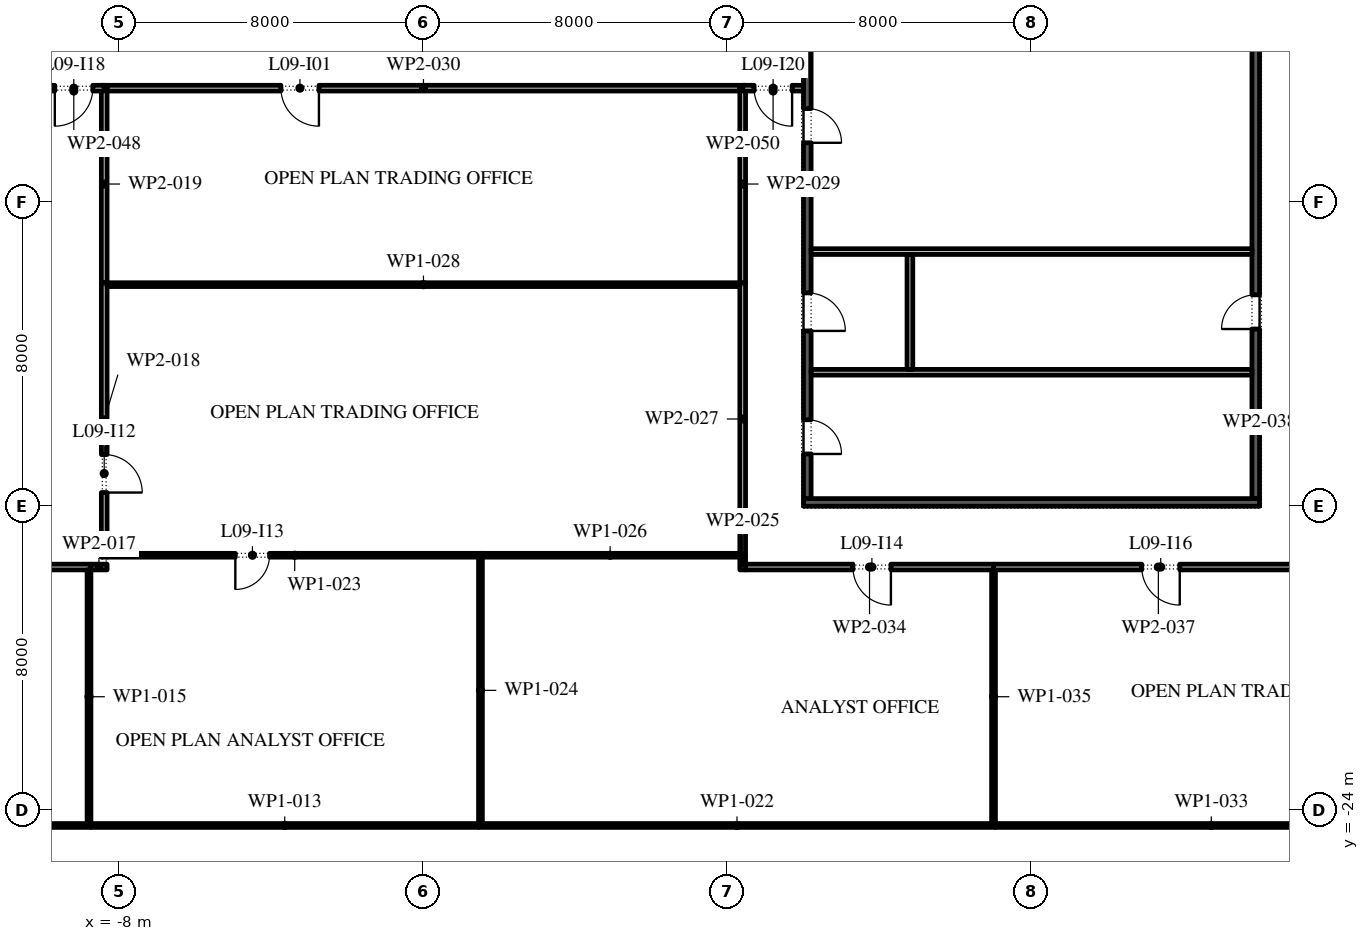
"""IFC4 building model, lengths in metres.
Left out: names, types, materials, properties, quantities, classifications, styles, units other than length and angle.
Written with IfcOpenShell. Run it as: python <this file> out.ifc"""

import sys

from ifc_helpers import new_model, si_unit, direction, frame, frame_2d, origin, place, context, subcontext, project, spatial, rectangle, extrude, element, fill, save


model = new_model("IFC4")
c1 = context("Model", 3, precision=1e-05, world=origin(), true_north=direction((0.0, 1.0)))
c2 = subcontext(c1, "Body", "Model", "MODEL_VIEW")
j1 = project(units=[si_unit("LENGTHUNIT", "METRE"), si_unit("PLANEANGLEUNIT", "RADIAN")], contexts=[c1])
p1 = place(None, origin())
s1 = spatial("IfcSite", under=j1, at=p1, CompositionType="ELEMENT")
p2 = place(p1, origin())
s2 = spatial("IfcBuilding", under=s1, at=p2, CompositionType="ELEMENT")
p3 = place(p2, frame((0.0, 0.0, 48.0)))
s3 = spatial("IfcBuildingStorey", under=s2, at=p3, CompositionType="ELEMENT", Elevation=48.0)
p4 = place(p3, frame((21.9, -15.8, 0.0), z_axis=(0.0, 0.0, 1.0), x_axis=(0.0, 1.0, 0.0)))
e1 = element("IfcWall", 1, at=p4, inside=s3, PredefinedType="SHEAR", context=c2, shape_type="SweptSolid", body=[
    extrude(rectangle(XDim=13.05, YDim=0.2, at=frame_2d((6.525, 0.0))), origin(), (0.0, 0.0, 1.0), 4.0),
])
p5 = place(p4, frame((4.462, 0.0, 0.0)))
e2 = element("IfcOpeningElement", 2, at=p5, cuts=e1, PredefinedType="OPENING", context=c2, shape_type="SweptSolid", body=[
    extrude(rectangle(XDim=0.9, YDim=2.1, at=frame_2d((0.45, 1.05))), frame((0.0, 0.11, 0.0), z_axis=(0.0, -1.0, 0.0), x_axis=(1.0, 0.0, 0.0)), (0.0, 0.0, 1.0), 0.22),
])
p6 = place(p3, frame((10.1, -15.8, 0.0), z_axis=(0.0, 0.0, 1.0), x_axis=(0.0, 1.0, 0.0)))
e3 = element("IfcWall", 3, at=p6, inside=s3, PredefinedType="SHEAR", context=c2, shape_type="SweptSolid", body=[
    extrude(rectangle(XDim=13.05, YDim=0.2, at=frame_2d((6.525, 0.0))), origin(), (0.0, 0.0, 1.0), 4.0),
])
p7 = place(p6, frame((1.175, 0.0, 0.0)))
e4 = element("IfcOpeningElement", 4, at=p7, cuts=e3, PredefinedType="OPENING", context=c2, shape_type="SweptSolid", body=[
    extrude(rectangle(XDim=0.9, YDim=2.1, at=frame_2d((0.45, 1.05))), frame((0.0, 0.11, 0.0), z_axis=(0.0, -1.0, 0.0), x_axis=(1.0, 0.0, 0.0)), (0.0, 0.0, 1.0), 0.22),
])
p8 = place(p6, frame((4.413, 0.0, 0.0)))
e5 = element("IfcOpeningElement", 5, at=p8, cuts=e3, PredefinedType="OPENING", context=c2, shape_type="SweptSolid", body=[
    extrude(rectangle(XDim=1.0, YDim=2.1, at=frame_2d((0.5, 1.05))), frame((0.0, 0.11, 0.0), z_axis=(0.0, -1.0, 0.0), x_axis=(1.0, 0.0, 0.0)), (0.0, 0.0, 1.0), 0.22),
])
p9 = place(p6, frame((9.363, 0.0, 0.0)))
e6 = element("IfcOpeningElement", 6, at=p9, cuts=e3, PredefinedType="OPENING", context=c2, shape_type="SweptSolid", body=[
    extrude(rectangle(XDim=0.9, YDim=2.1, at=frame_2d((0.45, 1.05))), frame((0.0, 0.11, 0.0), z_axis=(0.0, -1.0, 0.0), x_axis=(1.0, 0.0, 0.0)), (0.0, 0.0, 1.0), 0.22),
])
p10 = place(p3, frame((10.0, -15.9, 0.0), z_axis=(0.0, 0.0, 1.0), x_axis=(1.0, 0.0, 0.0)))
e7 = element("IfcWall", 7, at=p10, inside=s3, PredefinedType="SHEAR", context=c2, shape_type="SweptSolid", body=[
    extrude(rectangle(XDim=12.0, YDim=0.2, at=frame_2d((6.0, 0.0))), origin(), (0.0, 0.0, 1.0), 4.0),
])
for number, where, z_axis, x_axis in (
    (8, (10.2, -9.3, 0.0), (0.0, 0.0, 1.0), (1.0, 0.0, 0.0)),
    (9, (10.2, -12.475, 0.0), (0.0, 0.0, 1.0), (1.0, 0.0, 0.0)),
):
    element("IfcWall", number, at=place(p3, frame(where, z_axis=z_axis, x_axis=x_axis)), inside=s3, PredefinedType="PARTITIONING", context=c2, shape_type="SweptSolid", body=[
        extrude(rectangle(XDim=11.6, YDim=0.15, at=frame_2d((5.8, 0.0))), origin(), (0.0, 0.0, 1.0), 4.0),
    ])
p11 = place(p3, frame((12.8, -12.4, 0.0), z_axis=(0.0, 0.0, 1.0), x_axis=(0.0, 1.0, 0.0)))
e10 = element("IfcWall", 10, at=p11, inside=s3, PredefinedType="PARTITIONING", context=c2, shape_type="SweptSolid", body=[
    extrude(rectangle(XDim=3.025, YDim=0.15, at=frame_2d((1.512, 0.0))), origin(), (0.0, 0.0, 1.0), 4.0),
])
p12 = place(p3, frame((-26.41, -24.4, 0.0), z_axis=(0.0, 0.0, 1.0), x_axis=(1.0, 0.0, 0.0)))
e11 = element("IfcWall", 11, at=p12, inside=s3, PredefinedType="PARTITIONING", context=c2, shape_type="SweptSolid", body=[
    extrude(rectangle(XDim=17.66, YDim=0.1, at=frame_2d((8.83, 0.0))), origin(), (0.0, 0.0, 1.0), 4.0),
])
p13 = place(p12, frame((10.2, 0.0, 0.0)))
e12 = element("IfcOpeningElement", 12, at=p13, cuts=e11, PredefinedType="OPENING", context=c2, shape_type="SweptSolid", body=[
    extrude(rectangle(XDim=0.9, YDim=2.1, at=frame_2d((0.45, 1.05))), frame((0.0, 0.06, 0.0), z_axis=(0.0, -1.0, 0.0), x_axis=(1.0, 0.0, 0.0)), (0.0, 0.0, 1.0), 0.12),
])
p14 = place(p3, frame((-8.75, -24.4, 0.0), z_axis=(0.0, 0.0, 1.0), x_axis=(1.0, 0.0, 0.0)))
e13 = element("IfcWall", 13, at=p14, inside=s3, PredefinedType="PARTITIONING", context=c2, shape_type="SweptSolid", body=[
    extrude(rectangle(XDim=10.2, YDim=0.1, at=frame_2d((5.1, 0.0))), origin(), (0.0, 0.0, 1.0), 4.0),
])
p15 = place(p3, frame((-8.75, -17.6, 0.0), z_axis=(0.0, 0.0, 1.0), x_axis=(-1.0, 0.0, 0.0)))
e14 = element("IfcWall", 14, at=p15, inside=s3, PredefinedType="PARTITIONING", context=c2, shape_type="SweptSolid", body=[
    extrude(rectangle(XDim=14.775, YDim=0.15, at=frame_2d((7.387, 0.0))), origin(), (0.0, 0.0, 1.0), 4.0),
])
p16 = place(p15, frame((6.95, 0.0, 0.0)))
e15 = element("IfcOpeningElement", 15, at=p16, cuts=e14, PredefinedType="OPENING", context=c2, shape_type="SweptSolid", body=[
    extrude(rectangle(XDim=1.0, YDim=2.1, at=frame_2d((0.5, 1.05))), frame((0.0, 0.085, 0.0), z_axis=(0.0, -1.0, 0.0), x_axis=(1.0, 0.0, 0.0)), (0.0, 0.0, 1.0), 0.17),
])
p17 = place(p3, frame((-8.8, -17.675, 0.0), z_axis=(0.0, 0.0, 1.0), x_axis=(0.0, -1.0, 0.0)))
e16 = element("IfcWall", 16, at=p17, inside=s3, PredefinedType="PARTITIONING", context=c2, shape_type="SweptSolid", body=[
    extrude(rectangle(XDim=6.675, YDim=0.1, at=frame_2d((3.337, 0.0))), origin(), (0.0, 0.0, 1.0), 4.0),
])
p18 = place(p3, frame((-8.325, -17.6, 0.0), z_axis=(0.0, 0.0, 1.0), x_axis=(-1.0, 0.0, 0.0)))
e17 = element("IfcWall", 17, at=p18, inside=s3, PredefinedType="PARTITIONING", context=c2, shape_type="SweptSolid", body=[
    extrude(rectangle(XDim=0.425, YDim=0.15, at=frame_2d((0.212, 0.0))), origin(), (0.0, 0.0, 1.0), 4.0),
])
p19 = place(p3, frame((-8.4, -10.12, 0.0), z_axis=(0.0, 0.0, 1.0), x_axis=(0.0, -1.0, 0.0)))
e18 = element("IfcWall", 18, at=p19, inside=s3, PredefinedType="PARTITIONING", context=c2, shape_type="SweptSolid", body=[
    extrude(rectangle(XDim=7.22, YDim=0.15, at=frame_2d((3.61, 0.0))), origin(), (0.0, 0.0, 1.0), 4.0),
])
p20 = place(p19, frame((4.52, 0.0, 0.0)))
e19 = element("IfcOpeningElement", 19, at=p20, cuts=e18, PredefinedType="OPENING", context=c2, shape_type="SweptSolid", body=[
    extrude(rectangle(XDim=1.0, YDim=2.1, at=frame_2d((0.5, 1.05))), frame((0.0, 0.085, 0.0), z_axis=(0.0, -1.0, 0.0), x_axis=(1.0, 0.0, 0.0)), (0.0, 0.0, 1.0), 0.17),
])
p21 = place(p3, frame((-8.4, -4.925, 0.0), z_axis=(0.0, 0.0, 1.0), x_axis=(0.0, -1.0, 0.0)))
e20 = element("IfcWall", 20, at=p21, inside=s3, PredefinedType="PARTITIONING", context=c2, shape_type="SweptSolid", body=[
    extrude(rectangle(XDim=5.195, YDim=0.15, at=frame_2d((2.598, 0.0))), origin(), (0.0, 0.0, 1.0), 4.0),
])
p22 = place(p3, frame((1.45, -24.4, 0.0), z_axis=(0.0, 0.0, 1.0), x_axis=(1.0, 0.0, 0.0)))
e21 = element("IfcWall", 21, at=p22, inside=s3, PredefinedType="PARTITIONING", context=c2, shape_type="SweptSolid", body=[
    extrude(rectangle(XDim=13.6, YDim=0.1, at=frame_2d((6.8, 0.0))), origin(), (0.0, 0.0, 1.0), 4.0),
])
p23 = place(p3, frame((1.55, -17.29, 0.0), z_axis=(0.0, 0.0, 1.0), x_axis=(-1.0, 0.0, 0.0)))
e22 = element("IfcWall", 22, at=p23, inside=s3, PredefinedType="PARTITIONING", context=c2, shape_type="SweptSolid", body=[
    extrude(rectangle(XDim=9.875, YDim=0.1, at=frame_2d((4.938, 0.0))), origin(), (0.0, 0.0, 1.0), 4.0),
])
p24 = place(p23, frame((5.6, 0.0, 0.0)))
e23 = element("IfcOpeningElement", 23, at=p24, cuts=e22, PredefinedType="OPENING", context=c2, shape_type="SweptSolid", body=[
    extrude(rectangle(XDim=0.9, YDim=2.1, at=frame_2d((0.45, 1.05))), frame((0.0, 0.06, 0.0), z_axis=(0.0, -1.0, 0.0), x_axis=(1.0, 0.0, 0.0)), (0.0, 0.0, 1.0), 0.12),
])
p25 = place(p3, frame((1.5, -17.34, 0.0), z_axis=(0.0, 0.0, 1.0), x_axis=(0.0, -1.0, 0.0)))
e24 = element("IfcWall", 24, at=p25, inside=s3, PredefinedType="PARTITIONING", context=c2, shape_type="SweptSolid", body=[
    extrude(rectangle(XDim=7.01, YDim=0.1, at=frame_2d((3.505, 0.0))), origin(), (0.0, 0.0, 1.0), 4.0),
])
p26 = place(p3, frame((8.4, -17.675, 0.0), z_axis=(0.0, 0.0, 1.0), x_axis=(0.0, 1.0, 0.0)))
e25 = element("IfcWall", 25, at=p26, inside=s3, PredefinedType="PARTITIONING", context=c2, shape_type="SweptSolid", body=[
    extrude(rectangle(XDim=0.385, YDim=0.15, at=frame_2d((0.192, 0.0))), origin(), (0.0, 0.0, 1.0), 4.0),
])
p27 = place(p3, frame((8.325, -17.29, 0.0), z_axis=(0.0, 0.0, 1.0), x_axis=(-1.0, 0.0, 0.0)))
e26 = element("IfcWall", 26, at=p27, inside=s3, PredefinedType="PARTITIONING", context=c2, shape_type="SweptSolid", body=[
    extrude(rectangle(XDim=6.825, YDim=0.1, at=frame_2d((3.413, 0.0))), origin(), (0.0, 0.0, 1.0), 4.0),
])
p28 = place(p3, frame((8.4, -17.29, 0.0), z_axis=(0.0, 0.0, 1.0), x_axis=(0.0, 1.0, 0.0)))
e27 = element("IfcWall", 27, at=p28, inside=s3, PredefinedType="PARTITIONING", context=c2, shape_type="SweptSolid", body=[
    extrude(rectangle(XDim=7.17, YDim=0.15, at=frame_2d((3.585, 0.0))), origin(), (0.0, 0.0, 1.0), 4.0),
])
p29 = place(p3, frame((8.325, -10.17, 0.0), z_axis=(0.0, 0.0, 1.0), x_axis=(-1.0, 0.0, 0.0)))
e28 = element("IfcWall", 28, at=p29, inside=s3, PredefinedType="PARTITIONING", context=c2, shape_type="SweptSolid", body=[
    extrude(rectangle(XDim=16.65, YDim=0.1, at=frame_2d((8.325, 0.0))), origin(), (0.0, 0.0, 1.0), 4.0),
])
p30 = place(p3, frame((8.4, -10.12, 0.0), z_axis=(0.0, 0.0, 1.0), x_axis=(0.0, 1.0, 0.0)))
e29 = element("IfcWall", 29, at=p30, inside=s3, PredefinedType="PARTITIONING", context=c2, shape_type="SweptSolid", body=[
    extrude(rectangle(XDim=5.195, YDim=0.15, at=frame_2d((2.598, 0.0))), origin(), (0.0, 0.0, 1.0), 4.0),
])
p31 = place(p3, frame((8.325, -5.0, 0.0), z_axis=(0.0, 0.0, 1.0), x_axis=(-1.0, 0.0, 0.0)))
e30 = element("IfcWall", 30, at=p31, inside=s3, PredefinedType="PARTITIONING", context=c2, shape_type="SweptSolid", body=[
    extrude(rectangle(XDim=16.65, YDim=0.15, at=frame_2d((8.325, 0.0))), origin(), (0.0, 0.0, 1.0), 4.0),
])
p32 = place(p31, frame((11.075, 0.0, 0.0)))
e31 = element("IfcOpeningElement", 31, at=p32, cuts=e30, PredefinedType="OPENING", context=c2, shape_type="SweptSolid", body=[
    extrude(rectangle(XDim=1.0, YDim=2.1, at=frame_2d((0.5, 1.05))), frame((0.0, 0.085, 0.0), z_axis=(0.0, -1.0, 0.0), x_axis=(1.0, 0.0, 0.0)), (0.0, 0.0, 1.0), 0.17),
])
p33 = place(p3, frame((15.05, -24.4, 0.0), z_axis=(0.0, 0.0, 1.0), x_axis=(1.0, 0.0, 0.0)))
e32 = element("IfcWall", 32, at=p33, inside=s3, PredefinedType="PARTITIONING", context=c2, shape_type="SweptSolid", body=[
    extrude(rectangle(XDim=11.36, YDim=0.1, at=frame_2d((5.68, 0.0))), origin(), (0.0, 0.0, 1.0), 4.0),
])
p34 = place(p3, frame((15.0, -17.6, 0.0), z_axis=(0.0, 0.0, 1.0), x_axis=(-1.0, 0.0, 0.0)))
e33 = element("IfcWall", 33, at=p34, inside=s3, PredefinedType="PARTITIONING", context=c2, shape_type="SweptSolid", body=[
    extrude(rectangle(XDim=6.525, YDim=0.15, at=frame_2d((3.262, 0.0))), origin(), (0.0, 0.0, 1.0), 4.0),
])
p35 = place(p34, frame((2.7, 0.0, 0.0)))
e34 = element("IfcOpeningElement", 34, at=p35, cuts=e33, PredefinedType="OPENING", context=c2, shape_type="SweptSolid", body=[
    extrude(rectangle(XDim=1.0, YDim=2.1, at=frame_2d((0.5, 1.05))), frame((0.0, 0.085, 0.0), z_axis=(0.0, -1.0, 0.0), x_axis=(1.0, 0.0, 0.0)), (0.0, 0.0, 1.0), 0.17),
])
p36 = place(p3, frame((15.0, -17.675, 0.0), z_axis=(0.0, 0.0, 1.0), x_axis=(0.0, -1.0, 0.0)))
e35 = element("IfcWall", 35, at=p36, inside=s3, PredefinedType="PARTITIONING", context=c2, shape_type="SweptSolid", body=[
    extrude(rectangle(XDim=6.675, YDim=0.1, at=frame_2d((3.337, 0.0))), origin(), (0.0, 0.0, 1.0), 4.0),
])
p37 = place(p3, frame((23.675, -17.6, 0.0), z_axis=(0.0, 0.0, 1.0), x_axis=(-1.0, 0.0, 0.0)))
e36 = element("IfcWall", 36, at=p37, inside=s3, PredefinedType="PARTITIONING", context=c2, shape_type="SweptSolid", body=[
    extrude(rectangle(XDim=8.675, YDim=0.15, at=frame_2d((4.337, 0.0))), origin(), (0.0, 0.0, 1.0), 4.0),
])
p38 = place(p37, frame((3.775, 0.0, 0.0)))
e37 = element("IfcOpeningElement", 37, at=p38, cuts=e36, PredefinedType="OPENING", context=c2, shape_type="SweptSolid", body=[
    extrude(rectangle(XDim=1.0, YDim=2.1, at=frame_2d((0.5, 1.05))), frame((0.0, 0.085, 0.0), z_axis=(0.0, -1.0, 0.0), x_axis=(1.0, 0.0, 0.0)), (0.0, 0.0, 1.0), 0.17),
])
p39 = place(p3, frame((-8.4, -5.0, 0.0), z_axis=(0.0, 0.0, 1.0), x_axis=(-1.0, 0.0, 0.0)))
e38 = element("IfcWall", 38, at=p39, inside=s3, PredefinedType="PARTITIONING", context=c2, shape_type="SweptSolid", body=[
    extrude(rectangle(XDim=1.6, YDim=0.15, at=frame_2d((0.8, 0.0))), origin(), (0.0, 0.0, 1.0), 4.0),
])
p40 = place(p39, frame((0.3, 0.0, 0.0)))
e39 = element("IfcOpeningElement", 39, at=p40, cuts=e38, PredefinedType="OPENING", context=c2, shape_type="SweptSolid", body=[
    extrude(rectangle(XDim=1.0, YDim=2.1, at=frame_2d((0.5, 1.05))), frame((0.0, 0.085, 0.0), z_axis=(0.0, -1.0, 0.0), x_axis=(1.0, 0.0, 0.0)), (0.0, 0.0, 1.0), 0.17),
])
p41 = place(p3, frame((10.0, -5.0, 0.0), z_axis=(0.0, 0.0, 1.0), x_axis=(-1.0, 0.0, 0.0)))
e40 = element("IfcWall", 40, at=p41, inside=s3, PredefinedType="PARTITIONING", context=c2, shape_type="SweptSolid", body=[
    extrude(rectangle(XDim=1.6, YDim=0.15, at=frame_2d((0.8, 0.0))), origin(), (0.0, 0.0, 1.0), 4.0),
])
p42 = place(p41, frame((0.3, 0.0, 0.0)))
e41 = element("IfcOpeningElement", 41, at=p42, cuts=e40, PredefinedType="OPENING", context=c2, shape_type="SweptSolid", body=[
    extrude(rectangle(XDim=1.0, YDim=2.1, at=frame_2d((0.5, 1.05))), frame((0.0, 0.085, 0.0), z_axis=(0.0, -1.0, 0.0), x_axis=(1.0, 0.0, 0.0)), (0.0, 0.0, 1.0), 0.17),
])
p43 = place(p7, frame((0.9, -0.15, 0.0), z_axis=(0.0, 0.0, 1.0), x_axis=(-1.0, 0.0, 0.0)))
e42 = element("IfcDoor", 42, at=p43, inside=s3, OperationType="SINGLE_SWING_LEFT", PredefinedType="DOOR", context=c2, shape_type="SweptSolid", body=[
    extrude(rectangle(XDim=0.9, YDim=2.1, at=frame_2d((0.45, 1.05))), frame((0.0, -0.05, 0.0), z_axis=(0.0, -1.0, 0.0), x_axis=(1.0, 0.0, 0.0)), (0.0, 0.0, 1.0), 0.05),
])
fill(e4, e42)
p44 = place(p8, frame((1.0, -0.15, 0.0), z_axis=(0.0, 0.0, 1.0), x_axis=(-1.0, 0.0, 0.0)))
e43 = element("IfcDoor", 43, at=p44, inside=s3, OperationType="SINGLE_SWING_LEFT", PredefinedType="DOOR", context=c2, shape_type="SweptSolid", body=[
    extrude(rectangle(XDim=1.0, YDim=2.1, at=frame_2d((0.5, 1.05))), frame((0.0, -0.05, 0.0), z_axis=(0.0, -1.0, 0.0), x_axis=(1.0, 0.0, 0.0)), (0.0, 0.0, 1.0), 0.05),
])
fill(e5, e43)
p45 = place(p5, origin())
e44 = element("IfcDoor", 44, at=p45, inside=s3, OperationType="SINGLE_SWING_RIGHT", PredefinedType="DOOR", context=c2, shape_type="SweptSolid", body=[
    extrude(rectangle(XDim=0.9, YDim=2.1, at=frame_2d((0.45, 1.05))), frame((0.0, 0.1, 0.0), z_axis=(0.0, -1.0, 0.0), x_axis=(1.0, 0.0, 0.0)), (0.0, 0.0, 1.0), 0.05),
])
fill(e2, e44)
p46 = place(p9, frame((0.9, -0.15, 0.0), z_axis=(0.0, 0.0, 1.0), x_axis=(-1.0, 0.0, 0.0)))
e45 = element("IfcDoor", 45, at=p46, inside=s3, OperationType="SINGLE_SWING_LEFT", PredefinedType="DOOR", context=c2, shape_type="SweptSolid", body=[
    extrude(rectangle(XDim=0.9, YDim=2.1, at=frame_2d((0.45, 1.05))), frame((0.0, -0.05, 0.0), z_axis=(0.0, -1.0, 0.0), x_axis=(1.0, 0.0, 0.0)), (0.0, 0.0, 1.0), 0.05),
])
fill(e6, e45)
p47 = place(p32, origin())
e46 = element("IfcDoor", 46, at=p47, inside=s3, OperationType="SINGLE_SWING_RIGHT", PredefinedType="DOOR", context=c2, shape_type="SweptSolid", body=[
    extrude(rectangle(XDim=1.0, YDim=2.1, at=frame_2d((0.5, 1.05))), frame((0.0, 0.025, 0.0), z_axis=(0.0, -1.0, 0.0), x_axis=(1.0, 0.0, 0.0)), (0.0, 0.0, 1.0), 0.05),
])
fill(e31, e46)
p48 = place(p20, origin())
e47 = element("IfcDoor", 47, at=p48, inside=s3, OperationType="SINGLE_SWING_LEFT", PredefinedType="DOOR", context=c2, shape_type="SweptSolid", body=[
    extrude(rectangle(XDim=1.0, YDim=2.1, at=frame_2d((0.5, 1.05))), frame((0.0, 0.025, 0.0), z_axis=(0.0, -1.0, 0.0), x_axis=(1.0, 0.0, 0.0)), (0.0, 0.0, 1.0), 0.05),
])
fill(e19, e47)
p49 = place(p24, origin())
e48 = element("IfcDoor", 48, at=p49, inside=s3, OperationType="SINGLE_SWING_LEFT", PredefinedType="DOOR", context=c2, shape_type="SweptSolid", body=[
    extrude(rectangle(XDim=0.9, YDim=2.1, at=frame_2d((0.45, 1.05))), frame((0.0, 0.025, 0.0), z_axis=(0.0, -1.0, 0.0), x_axis=(1.0, 0.0, 0.0)), (0.0, 0.0, 1.0), 0.05),
])
fill(e23, e48)
p50 = place(p35, origin())
e49 = element("IfcDoor", 49, at=p50, inside=s3, OperationType="SINGLE_SWING_RIGHT", PredefinedType="DOOR", context=c2, shape_type="SweptSolid", body=[
    extrude(rectangle(XDim=1.0, YDim=2.1, at=frame_2d((0.5, 1.05))), frame((0.0, 0.025, 0.0), z_axis=(0.0, -1.0, 0.0), x_axis=(1.0, 0.0, 0.0)), (0.0, 0.0, 1.0), 0.05),
])
fill(e34, e49)
p51 = place(p38, origin())
e50 = element("IfcDoor", 50, at=p51, inside=s3, OperationType="SINGLE_SWING_RIGHT", PredefinedType="DOOR", context=c2, shape_type="SweptSolid", body=[
    extrude(rectangle(XDim=1.0, YDim=2.1, at=frame_2d((0.5, 1.05))), frame((0.0, 0.025, 0.0), z_axis=(0.0, -1.0, 0.0), x_axis=(1.0, 0.0, 0.0)), (0.0, 0.0, 1.0), 0.05),
])
fill(e37, e50)
p52 = place(p40, origin())
e51 = element("IfcDoor", 51, at=p52, inside=s3, OperationType="SINGLE_SWING_LEFT", PredefinedType="DOOR", context=c2, shape_type="SweptSolid", body=[
    extrude(rectangle(XDim=1.0, YDim=2.1, at=frame_2d((0.5, 1.05))), frame((0.0, 0.025, 0.0), z_axis=(0.0, -1.0, 0.0), x_axis=(1.0, 0.0, 0.0)), (0.0, 0.0, 1.0), 0.05),
])
fill(e39, e51)
p53 = place(p42, origin())
e52 = element("IfcDoor", 52, at=p53, inside=s3, OperationType="SINGLE_SWING_RIGHT", PredefinedType="DOOR", context=c2, shape_type="SweptSolid", body=[
    extrude(rectangle(XDim=1.0, YDim=2.1, at=frame_2d((0.5, 1.05))), frame((0.0, 0.025, 0.0), z_axis=(0.0, -1.0, 0.0), x_axis=(1.0, 0.0, 0.0)), (0.0, 0.0, 1.0), 0.05),
])
fill(e41, e52)
save(model, sys.argv[1])
